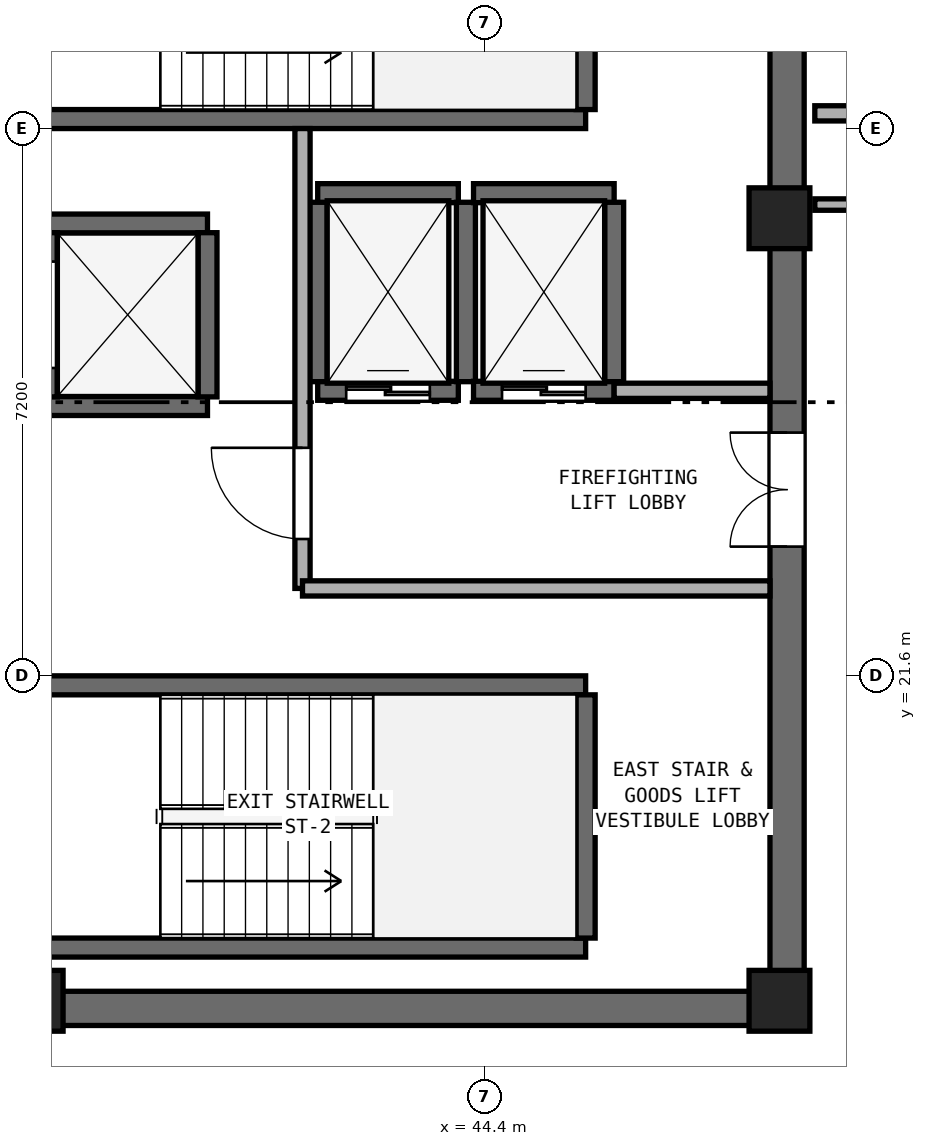
"""IFC4 building model, lengths in metres.
Left out: names, types, materials, properties, quantities, classifications, styles, units other than length and angle.
Written with IfcOpenShell. Run it as: python <this file> out.ifc"""

import sys

from ifc_helpers import new_model, si_unit, direction, frame, frame_2d, origin, origin_2d, place, context, subcontext, project, spatial, rectangle, extrude, element, fill, save


model = new_model("IFC4")
c1 = context("Model", 3, precision=1e-05, world=origin(), true_north=direction((0.0, 1.0)))
c2 = subcontext(c1, "Body", "Model", "MODEL_VIEW")
j1 = project(units=[si_unit("LENGTHUNIT", "METRE"), si_unit("PLANEANGLEUNIT", "RADIAN")], contexts=[c1])
p1 = place(None, origin())
s1 = spatial("IfcSite", under=j1, at=p1, CompositionType="ELEMENT")
p2 = place(p1, origin())
s2 = spatial("IfcBuilding", under=s1, at=p2, CompositionType="ELEMENT")
p3 = place(p2, frame((0.0, 0.0, 282.0)))
s3 = spatial("IfcBuildingStorey", under=s2, at=p3, CompositionType="ELEMENT", Elevation=282.0)
p4 = place(p3, frame((25.4, 17.225, 0.0), z_axis=(0.0, 0.0, 1.0), x_axis=(1.0, 0.0, 0.0)))
e1 = element("IfcWall", 1, at=p4, inside=s3, PredefinedType="SHEAR", context=c2, shape_type="SweptSolid", body=[
    extrude(rectangle(XDim=23.2, YDim=0.45, at=frame_2d((11.6, 0.0))), origin(), (0.0, 0.0, 1.0), 3.54),
])
p5 = place(p3, frame((48.375, 17.45, 0.0), z_axis=(0.0, 0.0, 1.0), x_axis=(0.0, 1.0, 0.0)))
e2 = element("IfcWall", 2, at=p5, inside=s3, PredefinedType="SHEAR", context=c2, shape_type="SweptSolid", body=[
    extrude(rectangle(XDim=15.5, YDim=0.45, at=frame_2d((7.75, 0.0))), origin(), (0.0, 0.0, 1.0), 3.54),
])
p6 = place(p5, frame((5.85, 0.0, 0.0)))
e3 = element("IfcOpeningElement", 3, at=p6, cuts=e2, PredefinedType="OPENING", context=c2, shape_type="SweptSolid", body=[
    extrude(rectangle(XDim=1.5, YDim=2.15, at=frame_2d((0.75, 1.075))), frame((0.0, 0.235, 0.0), z_axis=(0.0, -1.0, 0.0), x_axis=(1.0, 0.0, 0.0)), (0.0, 0.0, 1.0), 0.47),
])
for number, where, z_axis, x_axis in (
    (4, (38.45, 17.325, 0.0), (0.0, 0.0, 1.0), (1.0, 0.0, 0.0)),
    (5, (48.275, 17.325, 0.0), (0.0, 0.0, 1.0), (1.0, 0.0, 0.0)),
    (6, (48.275, 27.62, 0.0), (0.0, 0.0, 1.0), (1.0, 0.0, 0.0)),
):
    element("IfcColumn", number, at=place(p3, frame(where, z_axis=z_axis, x_axis=x_axis)), inside=s3, PredefinedType="PILASTER", context=c2, shape_type="SweptSolid", body=[
        extrude(rectangle(XDim=0.8, YDim=0.8, at=origin_2d()), origin(), (0.0, 0.0, 1.0), 3.8),
    ])
p7 = place(p3, frame((38.425, 28.925, 0.0), z_axis=(0.0, 0.0, 1.0), x_axis=(1.0, 0.0, 0.0)))
e7 = element("IfcWall", 7, at=p7, inside=s3, PredefinedType="SHEAR", context=c2, shape_type="SweptSolid", body=[
    extrude(rectangle(XDim=7.3, YDim=0.25, at=frame_2d((3.65, 0.0))), origin(), (0.0, 0.0, 1.0), 3.54),
])
p8 = place(p3, frame((45.725, 29.05, 0.0), z_axis=(0.0, 0.0, 1.0), x_axis=(0.0, 1.0, 0.0)))
e8 = element("IfcWall", 8, at=p8, inside=s3, PredefinedType="SHEAR", context=c2, shape_type="SweptSolid", body=[
    extrude(rectangle(XDim=3.2, YDim=0.25, at=frame_2d((1.6, 0.0))), origin(), (0.0, 0.0, 1.0), 3.54),
])
for number, where, z_axis, x_axis in (
    (9, (38.425, 18.025, 0.0), (0.0, 0.0, 1.0), (1.0, 0.0, 0.0)),
    (10, (38.425, 21.475, 0.0), (0.0, 0.0, 1.0), (1.0, 0.0, 0.0)),
):
    element("IfcWall", number, at=place(p3, frame(where, z_axis=z_axis, x_axis=x_axis)), inside=s3, PredefinedType="SHEAR", context=c2, shape_type="SweptSolid", body=[
        extrude(rectangle(XDim=7.3, YDim=0.25, at=frame_2d((3.65, 0.0))), origin(), (0.0, 0.0, 1.0), 3.54),
    ])
p9 = place(p3, frame((45.725, 18.15, 0.0), z_axis=(0.0, 0.0, 1.0), x_axis=(0.0, 1.0, 0.0)))
e11 = element("IfcWall", 11, at=p9, inside=s3, PredefinedType="SHEAR", context=c2, shape_type="SweptSolid", body=[
    extrude(rectangle(XDim=3.2, YDim=0.25, at=frame_2d((1.6, 0.0))), origin(), (0.0, 0.0, 1.0), 3.54),
])
p10 = place(p3, frame((42.2, 25.35, 0.0), z_axis=(0.0, 0.0, 1.0), x_axis=(1.0, 0.0, 0.0)))
e12 = element("IfcWall", 12, at=p10, inside=s3, PredefinedType="SHEAR", context=c2, shape_type="SweptSolid", body=[
    extrude(rectangle(XDim=1.85, YDim=0.25, at=frame_2d((0.925, 0.0))), origin(), (0.0, 0.0, 1.0), 3.54),
])
p11 = place(p10, frame((0.375, 0.0, 0.0)))
e13 = element("IfcOpeningElement", 13, at=p11, cuts=e12, PredefinedType="OPENING", context=c2, shape_type="SweptSolid", body=[
    extrude(rectangle(XDim=1.1, YDim=2.15, at=frame_2d((0.55, 1.075))), frame((0.0, 0.135, 0.0), z_axis=(0.0, -1.0, 0.0), x_axis=(1.0, 0.0, 0.0)), (0.0, 0.0, 1.0), 0.27),
])
p12 = place(p3, frame((42.2, 27.95, 0.0), z_axis=(0.0, 0.0, 1.0), x_axis=(1.0, 0.0, 0.0)))
e14 = element("IfcWall", 14, at=p12, inside=s3, PredefinedType="SHEAR", context=c2, shape_type="SweptSolid", body=[
    extrude(rectangle(XDim=1.85, YDim=0.25, at=frame_2d((0.925, 0.0))), origin(), (0.0, 0.0, 1.0), 3.54),
])
for number, where, z_axis, x_axis in (
    (15, (42.2, 25.47, 0.0), (0.0, 0.0, 1.0), (0.0, 1.0, 0.0)),
    (16, (44.15, 25.47, 0.0), (0.0, 0.0, 1.0), (0.0, 1.0, 0.0)),
):
    element("IfcWall", number, at=place(p3, frame(where, z_axis=z_axis, x_axis=x_axis)), inside=s3, PredefinedType="SHEAR", context=c2, shape_type="SweptSolid", body=[
        extrude(rectangle(XDim=2.36, YDim=0.25, at=frame_2d((1.18, 0.0))), origin(), (0.0, 0.0, 1.0), 3.54),
    ])
p13 = place(p3, frame((44.25, 25.35, 0.0), z_axis=(0.0, 0.0, 1.0), x_axis=(1.0, 0.0, 0.0)))
e17 = element("IfcWall", 17, at=p13, inside=s3, PredefinedType="SHEAR", context=c2, shape_type="SweptSolid", body=[
    extrude(rectangle(XDim=1.85, YDim=0.25, at=frame_2d((0.925, 0.0))), origin(), (0.0, 0.0, 1.0), 3.54),
])
p14 = place(p13, frame((0.375, 0.0, 0.0)))
e18 = element("IfcOpeningElement", 18, at=p14, cuts=e17, PredefinedType="OPENING", context=c2, shape_type="SweptSolid", body=[
    extrude(rectangle(XDim=1.1, YDim=2.15, at=frame_2d((0.55, 1.075))), frame((0.0, 0.135, 0.0), z_axis=(0.0, -1.0, 0.0), x_axis=(1.0, 0.0, 0.0)), (0.0, 0.0, 1.0), 0.27),
])
p15 = place(p3, frame((44.25, 27.95, 0.0), z_axis=(0.0, 0.0, 1.0), x_axis=(1.0, 0.0, 0.0)))
e19 = element("IfcWall", 19, at=p15, inside=s3, PredefinedType="SHEAR", context=c2, shape_type="SweptSolid", body=[
    extrude(rectangle(XDim=1.85, YDim=0.25, at=frame_2d((0.925, 0.0))), origin(), (0.0, 0.0, 1.0), 3.54),
])
p16 = place(p3, frame((46.1, 25.47, 0.0), z_axis=(0.0, 0.0, 1.0), x_axis=(0.0, 1.0, 0.0)))
e20 = element("IfcWall", 20, at=p16, inside=s3, PredefinedType="SHEAR", context=c2, shape_type="SweptSolid", body=[
    extrude(rectangle(XDim=2.36, YDim=0.25, at=frame_2d((1.18, 0.0))), origin(), (0.0, 0.0, 1.0), 3.54),
])
for number, where, z_axis, x_axis in (
    (21, (38.65, 25.15, 0.0), (0.0, 0.0, 1.0), (1.0, 0.0, 0.0)),
    (22, (38.65, 27.55, 0.0), (0.0, 0.0, 1.0), (1.0, 0.0, 0.0)),
):
    element("IfcWall", number, at=place(p3, frame(where, z_axis=z_axis, x_axis=x_axis)), inside=s3, PredefinedType="SHEAR", context=c2, shape_type="SweptSolid", body=[
        extrude(rectangle(XDim=2.1, YDim=0.25, at=frame_2d((1.05, 0.0))), origin(), (0.0, 0.0, 1.0), 3.54),
    ])
p17 = place(p3, frame((38.65, 25.27, 0.0), z_axis=(0.0, 0.0, 1.0), x_axis=(0.0, 1.0, 0.0)))
e23 = element("IfcWall", 23, at=p17, inside=s3, PredefinedType="SHEAR", context=c2, shape_type="SweptSolid", body=[
    extrude(rectangle(XDim=2.16, YDim=0.25, at=frame_2d((1.08, 0.0))), origin(), (0.0, 0.0, 1.0), 3.54),
])
p18 = place(p17, frame((0.38, 0.0, 0.0)))
e24 = element("IfcOpeningElement", 24, at=p18, cuts=e23, PredefinedType="OPENING", context=c2, shape_type="SweptSolid", body=[
    extrude(rectangle(XDim=1.4, YDim=2.2, at=frame_2d((0.7, 1.1))), frame((0.0, 0.135, 0.0), z_axis=(0.0, -1.0, 0.0), x_axis=(1.0, 0.0, 0.0)), (0.0, 0.0, 1.0), 0.27),
])
p19 = place(p3, frame((40.75, 25.27, 0.0), z_axis=(0.0, 0.0, 1.0), x_axis=(0.0, 1.0, 0.0)))
e25 = element("IfcWall", 25, at=p19, inside=s3, PredefinedType="SHEAR", context=c2, shape_type="SweptSolid", body=[
    extrude(rectangle(XDim=2.16, YDim=0.25, at=frame_2d((1.08, 0.0))), origin(), (0.0, 0.0, 1.0), 3.54),
])
p20 = place(p3, frame((42.0, 22.75, 0.0), z_axis=(0.0, 0.0, 1.0), x_axis=(0.0, 1.0, 0.0)))
e26 = element("IfcWall", 26, at=p20, inside=s3, PredefinedType="SOLIDWALL", context=c2, shape_type="SweptSolid", body=[
    extrude(rectangle(XDim=6.05, YDim=0.2, at=frame_2d((3.025, 0.0))), origin(), (0.0, 0.0, 1.0), 3.54),
])
p21 = place(p20, frame((0.65, 0.0, 0.0)))
e27 = element("IfcOpeningElement", 27, at=p21, cuts=e26, PredefinedType="OPENING", context=c2, shape_type="SweptSolid", body=[
    extrude(rectangle(XDim=1.2, YDim=2.15, at=frame_2d((0.6, 1.075))), frame((0.0, 0.11, 0.0), z_axis=(0.0, -1.0, 0.0), x_axis=(1.0, 0.0, 0.0)), (0.0, 0.0, 1.0), 0.22),
])
p22 = place(p3, frame((42.0, 22.75, 0.0), z_axis=(0.0, 0.0, 1.0), x_axis=(1.0, 0.0, 0.0)))
e28 = element("IfcWall", 28, at=p22, inside=s3, PredefinedType="SOLIDWALL", context=c2, shape_type="SweptSolid", body=[
    extrude(rectangle(XDim=6.15, YDim=0.2, at=frame_2d((3.075, 0.0))), origin(), (0.0, 0.0, 1.0), 3.54),
])
p23 = place(p3, frame((46.1, 25.35, 0.0), z_axis=(0.0, 0.0, 1.0), x_axis=(1.0, 0.0, 0.0)))
e29 = element("IfcWall", 29, at=p23, inside=s3, PredefinedType="SOLIDWALL", context=c2, shape_type="SweptSolid", body=[
    extrude(rectangle(XDim=2.05, YDim=0.2, at=frame_2d((1.025, 0.0))), origin(), (0.0, 0.0, 1.0), 3.54),
])
p24 = place(p3, frame((48.74, 27.8, 0.0), z_axis=(0.0, 0.0, 1.0), x_axis=(1.0, 0.0, 0.0)))
e30 = element("IfcWall", 30, at=p24, inside=s3, PredefinedType="PARTITIONING", context=c2, shape_type="SweptSolid", body=[
    extrude(rectangle(XDim=2.41, YDim=0.15, at=frame_2d((1.205, 0.0))), origin(), (0.0, 0.0, 1.0), 3.54),
])
p25 = place(p3, frame((48.74, 29.0, 0.0), z_axis=(0.0, 0.0, 1.0), x_axis=(1.0, 0.0, 0.0)))
e31 = element("IfcWall", 31, at=p25, inside=s3, PredefinedType="PARTITIONING", context=c2, shape_type="SweptSolid", body=[
    extrude(rectangle(XDim=13.655, YDim=0.2, at=frame_2d((6.828, 0.0))), origin(), (0.0, 0.0, 1.0), 3.54),
])
p26 = place(p11, origin())
e32 = element("IfcDoor", 32, at=p26, inside=s3, OperationType="DOUBLE_DOOR_SLIDING", PredefinedType="DOOR", context=c2, shape_type="SweptSolid", body=[
    extrude(rectangle(XDim=1.1, YDim=2.15, at=frame_2d((0.55, 1.075))), frame((0.0, 0.025, 0.0), z_axis=(0.0, -1.0, 0.0), x_axis=(1.0, 0.0, 0.0)), (0.0, 0.0, 1.0), 0.05),
])
fill(e13, e32)
p27 = place(p14, origin())
e33 = element("IfcDoor", 33, at=p27, inside=s3, OperationType="DOUBLE_DOOR_SLIDING", PredefinedType="DOOR", context=c2, shape_type="SweptSolid", body=[
    extrude(rectangle(XDim=1.1, YDim=2.15, at=frame_2d((0.55, 1.075))), frame((0.0, 0.025, 0.0), z_axis=(0.0, -1.0, 0.0), x_axis=(1.0, 0.0, 0.0)), (0.0, 0.0, 1.0), 0.05),
])
fill(e18, e33)
p28 = place(p21, origin())
e34 = element("IfcDoor", 34, at=p28, inside=s3, OperationType="SINGLE_SWING_RIGHT", PredefinedType="DOOR", context=c2, shape_type="SweptSolid", body=[
    extrude(rectangle(XDim=1.2, YDim=2.15, at=frame_2d((0.6, 1.075))), frame((0.0, 0.025, 0.0), z_axis=(0.0, -1.0, 0.0), x_axis=(1.0, 0.0, 0.0)), (0.0, 0.0, 1.0), 0.05),
])
fill(e27, e34)
p29 = place(p6, origin())
e35 = element("IfcDoor", 35, at=p29, inside=s3, OperationType="DOUBLE_DOOR_SINGLE_SWING", PredefinedType="DOOR", context=c2, shape_type="SweptSolid", body=[
    extrude(rectangle(XDim=1.5, YDim=2.15, at=frame_2d((0.75, 1.075))), frame((0.0, 0.025, 0.0), z_axis=(0.0, -1.0, 0.0), x_axis=(1.0, 0.0, 0.0)), (0.0, 0.0, 1.0), 0.05),
])
fill(e3, e35)
save(model, sys.argv[1])
